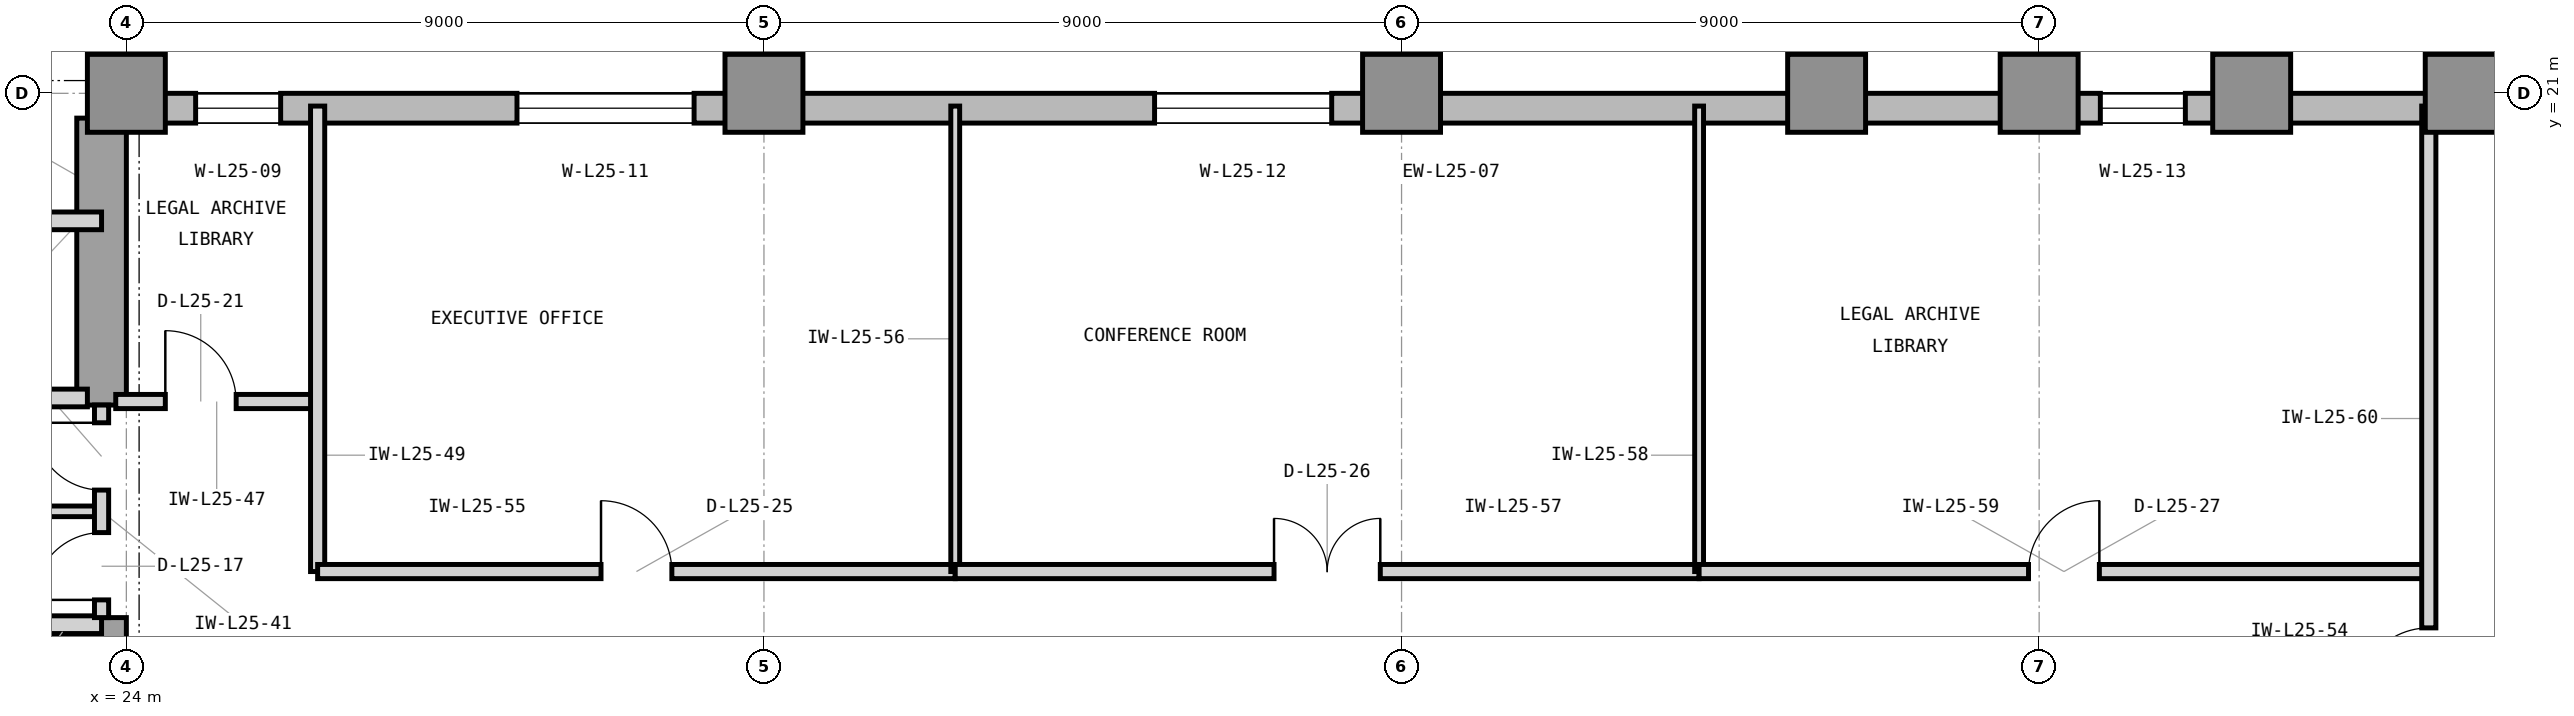
"""IFC4 building model, lengths in metres.
Left out: names, types, materials, properties, quantities, classifications, styles, units other than length and angle.
Written with IfcOpenShell. Run it as: python <this file> out.ifc"""

import sys

from ifc_helpers import new_model, si_unit, direction, frame, frame_2d, origin, origin_2d, place, context, subcontext, project, spatial, rectangle, extrude, element, fill, save


model = new_model("IFC4")
c1 = context("Model", 3, precision=1e-05, world=origin(), true_north=direction((0.0, 1.0)))
c2 = subcontext(c1, "Body", "Model", "MODEL_VIEW")
j1 = project(units=[si_unit("LENGTHUNIT", "METRE"), si_unit("PLANEANGLEUNIT", "RADIAN")], contexts=[c1])
p1 = place(None, origin())
s1 = spatial("IfcSite", under=j1, at=p1, CompositionType="ELEMENT")
p2 = place(p1, origin())
s2 = spatial("IfcBuilding", under=s1, at=p2, CompositionType="ELEMENT")
p3 = place(p2, frame((0.0, 0.0, 108.9)))
s3 = spatial("IfcBuildingStorey", under=s2, at=p3, CompositionType="ELEMENT", Elevation=108.9)
p4 = place(p3, frame((23.65, 10.4, 0.0), z_axis=(0.0, 0.0, 1.0), x_axis=(0.0, 1.0, 0.0)))
e1 = element("IfcWall", 1, at=p4, inside=s3, PredefinedType="SHEAR", context=c2, shape_type="SweptSolid", body=[
    extrude(rectangle(XDim=3.2, YDim=0.7, at=frame_2d((1.6, 0.0))), origin(), (0.0, 0.0, 1.0), 3.9),
])
p5 = place(p3, frame((23.65, 16.6, 0.0), z_axis=(0.0, 0.0, 1.0), x_axis=(0.0, 1.0, 0.0)))
e2 = element("IfcWall", 2, at=p5, inside=s3, PredefinedType="SHEAR", context=c2, shape_type="SweptSolid", body=[
    extrude(rectangle(XDim=4.05, YDim=0.7, at=frame_2d((2.025, 0.0))), origin(), (0.0, 0.0, 1.0), 3.9),
])
for number, where, z_axis, x_axis in (
    (3, (24.0, 21.0, 0.0), (0.0, 0.0, 1.0), (1.0, 0.0, 0.0)),
    (4, (33.0, 21.0, 0.0), (0.0, 0.0, 1.0), (1.0, 0.0, 0.0)),
    (5, (42.0, 21.0, 0.0), (0.0, 0.0, 1.0), (1.0, 0.0, 0.0)),
    (6, (48.0, 21.0, 0.0), (0.0, 0.0, 1.0), (1.0, 0.0, 0.0)),
    (7, (51.0, 21.0, 0.0), (0.0, 0.0, 1.0), (1.0, 0.0, 0.0)),
    (8, (54.0, 21.0, 0.0), (0.0, 0.0, 1.0), (1.0, 0.0, 0.0)),
    (9, (57.0, 21.0, 0.0), (0.0, 0.0, 1.0), (1.0, 0.0, 0.0)),
):
    element("IfcColumn", number, at=place(p3, frame(where, z_axis=z_axis, x_axis=x_axis)), inside=s3, PredefinedType="COLUMN", context=c2, shape_type="SweptSolid", body=[
        extrude(rectangle(XDim=1.1, YDim=1.1, at=origin_2d()), origin(), (0.0, 0.0, 1.0), 3.9),
    ])
p6 = place(p3, frame((61.4, 20.79, 0.0), z_axis=(0.0, 0.0, 1.0), x_axis=(-1.0, 0.0, 0.0)))
e10 = element("IfcWall", 10, at=p6, inside=s3, PredefinedType="STANDARD", context=c2, shape_type="SweptSolid", body=[
    extrude(rectangle(XDim=37.4, YDim=0.42, at=frame_2d((18.7, 0.0))), origin(), (0.0, 0.0, 1.0), 3.7),
])
p7 = place(p6, frame((35.222, 0.0, 0.85)))
e11 = element("IfcOpeningElement", 11, at=p7, cuts=e10, PredefinedType="OPENING", context=c2, shape_type="SweptSolid", body=[
    extrude(rectangle(XDim=1.2, YDim=2.25, at=frame_2d((0.6, 1.125))), frame((0.0, 0.22, 0.0), z_axis=(0.0, -1.0, 0.0), x_axis=(1.0, 0.0, 0.0)), (0.0, 0.0, 1.0), 0.44),
])
p8 = place(p6, frame((29.386, 0.0, 0.85)))
e12 = element("IfcOpeningElement", 12, at=p8, cuts=e10, PredefinedType="OPENING", context=c2, shape_type="SweptSolid", body=[
    extrude(rectangle(XDim=2.5, YDim=2.25, at=frame_2d((1.25, 1.125))), frame((0.0, 0.22, 0.0), z_axis=(0.0, -1.0, 0.0), x_axis=(1.0, 0.0, 0.0)), (0.0, 0.0, 1.0), 0.44),
])
p9 = place(p6, frame((20.386, 0.0, 0.85)))
e13 = element("IfcOpeningElement", 13, at=p9, cuts=e10, PredefinedType="OPENING", context=c2, shape_type="SweptSolid", body=[
    extrude(rectangle(XDim=2.5, YDim=2.25, at=frame_2d((1.25, 1.125))), frame((0.0, 0.22, 0.0), z_axis=(0.0, -1.0, 0.0), x_axis=(1.0, 0.0, 0.0)), (0.0, 0.0, 1.0), 0.44),
])
p10 = place(p6, frame((8.336, 0.0, 0.85)))
e14 = element("IfcOpeningElement", 14, at=p10, cuts=e10, PredefinedType="OPENING", context=c2, shape_type="SweptSolid", body=[
    extrude(rectangle(XDim=1.2, YDim=2.25, at=frame_2d((0.6, 1.125))), frame((0.0, 0.22, 0.0), z_axis=(0.0, -1.0, 0.0), x_axis=(1.0, 0.0, 0.0)), (0.0, 0.0, 1.0), 0.44),
])
p11 = place(p3, frame((23.79, 21.0, 0.0), z_axis=(0.0, 0.0, 1.0), x_axis=(0.0, 1.0, 0.0)))
e15 = element("IfcWall", 15, at=p11, inside=s3, PredefinedType="STANDARD", context=c2, shape_type="SweptSolid", body=[
    extrude(rectangle(XDim=25.4, YDim=0.42, at=frame_2d((12.7, 0.0))), origin(), (0.0, 0.0, 1.0), 3.7),
])
p12 = place(p11, frame((11.45, 0.0, 0.85)))
e16 = element("IfcOpeningElement", 16, at=p12, cuts=e15, PredefinedType="OPENING", context=c2, shape_type="SweptSolid", body=[
    extrude(rectangle(XDim=2.5, YDim=2.25, at=frame_2d((1.25, 1.125))), frame((0.0, 0.22, 0.0), z_axis=(0.0, -1.0, 0.0), x_axis=(1.0, 0.0, 0.0)), (0.0, 0.0, 1.0), 0.44),
])
p13 = place(p3, frame((21.05, 16.7, 0.0), z_axis=(0.0, 0.0, 1.0), x_axis=(1.0, 0.0, 0.0)))
e17 = element("IfcWall", 17, at=p13, inside=s3, PredefinedType="PARTITIONING", context=c2, shape_type="SweptSolid", body=[
    extrude(rectangle(XDim=2.4, YDim=0.25, at=frame_2d((1.2, 0.0))), origin(), (0.0, 0.0, 1.0), 3.227),
])
p14 = place(p3, frame((16.45, 19.2, 0.0), z_axis=(0.0, 0.0, 1.0), x_axis=(1.0, 0.0, 0.0)))
e18 = element("IfcWall", 18, at=p14, inside=s3, PredefinedType="PARTITIONING", context=c2, shape_type="SweptSolid", body=[
    extrude(rectangle(XDim=7.2, YDim=0.25, at=frame_2d((3.6, 0.0))), origin(), (0.0, 0.0, 1.0), 3.69),
])
p15 = place(p3, frame((14.7, 13.5, 0.0), z_axis=(0.0, 0.0, 1.0), x_axis=(1.0, 0.0, 0.0)))
e19 = element("IfcWall", 19, at=p15, inside=s3, PredefinedType="PARTITIONING", context=c2, shape_type="SweptSolid", body=[
    extrude(rectangle(XDim=8.95, YDim=0.25, at=frame_2d((4.475, 0.0))), origin(), (0.0, 0.0, 1.0), 3.227),
])
p16 = place(p3, frame((19.65, 15.1, 0.0), z_axis=(0.0, 0.0, 1.0), x_axis=(1.0, 0.0, 0.0)))
e20 = element("IfcWall", 20, at=p16, inside=s3, PredefinedType="PARTITIONING", context=c2, shape_type="SweptSolid", body=[
    extrude(rectangle(XDim=4.0, YDim=0.15, at=frame_2d((2.0, 0.0))), origin(), (0.0, 0.0, 1.0), 3.69),
])
p17 = place(p3, frame((23.65, 13.6, 0.0), z_axis=(0.0, 0.0, 1.0), x_axis=(0.0, 1.0, 0.0)))
e21 = element("IfcWall", 21, at=p17, inside=s3, PredefinedType="PARTITIONING", context=c2, shape_type="SweptSolid", body=[
    extrude(rectangle(XDim=3.0, YDim=0.2, at=frame_2d((1.5, 0.0))), origin(), (0.0, 0.0, 1.0), 3.69),
])
p18 = place(p17, frame((0.25, 0.0, 0.0)))
e22 = element("IfcOpeningElement", 22, at=p18, cuts=e21, PredefinedType="OPENING", context=c2, shape_type="SweptSolid", body=[
    extrude(rectangle(XDim=0.95, YDim=2.1, at=frame_2d((0.475, 1.05))), frame((0.0, 0.11, 0.0), z_axis=(0.0, -1.0, 0.0), x_axis=(1.0, 0.0, 0.0)), (0.0, 0.0, 1.0), 0.22),
])
p19 = place(p17, frame((1.8, 0.0, 0.0)))
e23 = element("IfcOpeningElement", 23, at=p19, cuts=e21, PredefinedType="OPENING", context=c2, shape_type="SweptSolid", body=[
    extrude(rectangle(XDim=0.95, YDim=2.1, at=frame_2d((0.475, 1.05))), frame((0.0, 0.11, 0.0), z_axis=(0.0, -1.0, 0.0), x_axis=(1.0, 0.0, 0.0)), (0.0, 0.0, 1.0), 0.22),
])
p20 = place(p3, frame((23.85, 16.65, 0.0), z_axis=(0.0, 0.0, 1.0), x_axis=(1.0, 0.0, 0.0)))
e24 = element("IfcWall", 24, at=p20, inside=s3, PredefinedType="PARTITIONING", context=c2, shape_type="SweptSolid", body=[
    extrude(rectangle(XDim=2.85, YDim=0.2, at=frame_2d((1.425, 0.0))), origin(), (0.0, 0.0, 1.0), 3.69),
])
p21 = place(p20, frame((0.7, 0.0, 0.0)))
e25 = element("IfcOpeningElement", 25, at=p21, cuts=e24, PredefinedType="OPENING", context=c2, shape_type="SweptSolid", body=[
    extrude(rectangle(XDim=1.0, YDim=2.15, at=frame_2d((0.5, 1.075))), frame((0.0, 0.11, 0.0), z_axis=(0.0, -1.0, 0.0), x_axis=(1.0, 0.0, 0.0)), (0.0, 0.0, 1.0), 0.22),
])
p22 = place(p3, frame((26.7, 14.25, 0.0), z_axis=(0.0, 0.0, 1.0), x_axis=(0.0, 1.0, 0.0)))
e26 = element("IfcWall", 26, at=p22, inside=s3, PredefinedType="PARTITIONING", context=c2, shape_type="SweptSolid", body=[
    extrude(rectangle(XDim=6.57, YDim=0.2, at=frame_2d((3.285, 0.0))), origin(), (0.0, 0.0, 1.0), 3.69),
])
p23 = place(p3, frame((26.7, 14.25, 0.0), z_axis=(0.0, 0.0, 1.0), x_axis=(1.0, 0.0, 0.0)))
e27 = element("IfcWall", 27, at=p23, inside=s3, PredefinedType="PARTITIONING", context=c2, shape_type="SweptSolid", body=[
    extrude(rectangle(XDim=9.0, YDim=0.2, at=frame_2d((4.5, 0.0))), origin(), (0.0, 0.0, 1.0), 3.69),
])
p24 = place(p23, frame((4.0, 0.0, 0.0)))
e28 = element("IfcOpeningElement", 28, at=p24, cuts=e27, PredefinedType="OPENING", context=c2, shape_type="SweptSolid", body=[
    extrude(rectangle(XDim=1.0, YDim=2.15, at=frame_2d((0.5, 1.075))), frame((0.0, 0.11, 0.0), z_axis=(0.0, -1.0, 0.0), x_axis=(1.0, 0.0, 0.0)), (0.0, 0.0, 1.0), 0.22),
])
p25 = place(p3, frame((35.7, 14.25, 0.0), z_axis=(0.0, 0.0, 1.0), x_axis=(0.0, 1.0, 0.0)))
e29 = element("IfcWall", 29, at=p25, inside=s3, PredefinedType="PARTITIONING", context=c2, shape_type="SweptSolid", body=[
    extrude(rectangle(XDim=6.57, YDim=0.125, at=frame_2d((3.285, 0.0))), origin(), (0.0, 0.0, 1.0), 3.69),
])
p26 = place(p3, frame((35.7, 14.25, 0.0), z_axis=(0.0, 0.0, 1.0), x_axis=(1.0, 0.0, 0.0)))
e30 = element("IfcWall", 30, at=p26, inside=s3, PredefinedType="PARTITIONING", context=c2, shape_type="SweptSolid", body=[
    extrude(rectangle(XDim=10.5, YDim=0.2, at=frame_2d((5.25, 0.0))), origin(), (0.0, 0.0, 1.0), 3.69),
])
p27 = place(p26, frame((4.5, 0.0, 0.0)))
e31 = element("IfcOpeningElement", 31, at=p27, cuts=e30, PredefinedType="OPENING", context=c2, shape_type="SweptSolid", body=[
    extrude(rectangle(XDim=1.5, YDim=2.3, at=frame_2d((0.75, 1.15))), frame((0.0, 0.11, 0.0), z_axis=(0.0, -1.0, 0.0), x_axis=(1.0, 0.0, 0.0)), (0.0, 0.0, 1.0), 0.22),
])
p28 = place(p3, frame((46.2, 14.25, 0.0), z_axis=(0.0, 0.0, 1.0), x_axis=(0.0, 1.0, 0.0)))
e32 = element("IfcWall", 32, at=p28, inside=s3, PredefinedType="PARTITIONING", context=c2, shape_type="SweptSolid", body=[
    extrude(rectangle(XDim=6.57, YDim=0.125, at=frame_2d((3.285, 0.0))), origin(), (0.0, 0.0, 1.0), 3.69),
])
p29 = place(p3, frame((46.2, 14.25, 0.0), z_axis=(0.0, 0.0, 1.0), x_axis=(1.0, 0.0, 0.0)))
e33 = element("IfcWall", 33, at=p29, inside=s3, PredefinedType="PARTITIONING", context=c2, shape_type="SweptSolid", body=[
    extrude(rectangle(XDim=10.3, YDim=0.2, at=frame_2d((5.15, 0.0))), origin(), (0.0, 0.0, 1.0), 3.69),
])
p30 = place(p29, frame((4.65, 0.0, 0.0)))
e34 = element("IfcOpeningElement", 34, at=p30, cuts=e33, PredefinedType="OPENING", context=c2, shape_type="SweptSolid", body=[
    extrude(rectangle(XDim=1.0, YDim=2.15, at=frame_2d((0.5, 1.075))), frame((0.0, 0.11, 0.0), z_axis=(0.0, -1.0, 0.0), x_axis=(1.0, 0.0, 0.0)), (0.0, 0.0, 1.0), 0.22),
])
p31 = place(p3, frame((56.5, 3.18, 0.0), z_axis=(0.0, 0.0, 1.0), x_axis=(0.0, 1.0, 0.0)))
e35 = element("IfcWall", 35, at=p31, inside=s3, PredefinedType="PARTITIONING", context=c2, shape_type="SweptSolid", body=[
    extrude(rectangle(XDim=17.64, YDim=0.2, at=frame_2d((8.82, 0.0))), origin(), (0.0, 0.0, 1.0), 3.69),
])
p32 = place(p31, frame((9.275, 0.0, 0.0)))
e36 = element("IfcOpeningElement", 36, at=p32, cuts=e35, PredefinedType="OPENING", context=c2, shape_type="SweptSolid", body=[
    extrude(rectangle(XDim=1.0, YDim=2.15, at=frame_2d((0.5, 1.075))), frame((0.0, 0.11, 0.0), z_axis=(0.0, -1.0, 0.0), x_axis=(1.0, 0.0, 0.0)), (0.0, 0.0, 1.0), 0.22),
])
p33 = place(p18, origin())
e37 = element("IfcDoor", 37, at=p33, inside=s3, OperationType="SINGLE_SWING_LEFT", PredefinedType="DOOR", context=c2, shape_type="SweptSolid", body=[
    extrude(rectangle(XDim=0.95, YDim=2.1, at=frame_2d((0.475, 1.05))), frame((0.0, 0.025, 0.0), z_axis=(0.0, -1.0, 0.0), x_axis=(1.0, 0.0, 0.0)), (0.0, 0.0, 1.0), 0.05),
])
fill(e22, e37)
p34 = place(p19, origin())
e38 = element("IfcDoor", 38, at=p34, inside=s3, OperationType="SINGLE_SWING_RIGHT", PredefinedType="DOOR", context=c2, shape_type="SweptSolid", body=[
    extrude(rectangle(XDim=0.95, YDim=2.1, at=frame_2d((0.475, 1.05))), frame((0.0, 0.025, 0.0), z_axis=(0.0, -1.0, 0.0), x_axis=(1.0, 0.0, 0.0)), (0.0, 0.0, 1.0), 0.05),
])
fill(e23, e38)
p35 = place(p21, origin())
e39 = element("IfcDoor", 39, at=p35, inside=s3, OperationType="SINGLE_SWING_LEFT", PredefinedType="DOOR", context=c2, shape_type="SweptSolid", body=[
    extrude(rectangle(XDim=1.0, YDim=2.15, at=frame_2d((0.5, 1.075))), frame((0.0, 0.025, 0.0), z_axis=(0.0, -1.0, 0.0), x_axis=(1.0, 0.0, 0.0)), (0.0, 0.0, 1.0), 0.05),
])
fill(e25, e39)
p36 = place(p24, origin())
e40 = element("IfcDoor", 40, at=p36, inside=s3, OperationType="SINGLE_SWING_LEFT", PredefinedType="DOOR", context=c2, shape_type="SweptSolid", body=[
    extrude(rectangle(XDim=1.0, YDim=2.15, at=frame_2d((0.5, 1.075))), frame((0.0, 0.025, 0.0), z_axis=(0.0, -1.0, 0.0), x_axis=(1.0, 0.0, 0.0)), (0.0, 0.0, 1.0), 0.05),
])
fill(e28, e40)
p37 = place(p27, origin())
e41 = element("IfcDoor", 41, at=p37, inside=s3, OperationType="DOUBLE_DOOR_SINGLE_SWING", PredefinedType="DOOR", context=c2, shape_type="SweptSolid", body=[
    extrude(rectangle(XDim=1.5, YDim=2.3, at=frame_2d((0.75, 1.15))), frame((0.0, 0.025, 0.0), z_axis=(0.0, -1.0, 0.0), x_axis=(1.0, 0.0, 0.0)), (0.0, 0.0, 1.0), 0.05),
])
fill(e31, e41)
p38 = place(p30, origin())
e42 = element("IfcDoor", 42, at=p38, inside=s3, OperationType="SINGLE_SWING_RIGHT", PredefinedType="DOOR", context=c2, shape_type="SweptSolid", body=[
    extrude(rectangle(XDim=1.0, YDim=2.15, at=frame_2d((0.5, 1.075))), frame((0.0, 0.025, 0.0), z_axis=(0.0, -1.0, 0.0), x_axis=(1.0, 0.0, 0.0)), (0.0, 0.0, 1.0), 0.05),
])
fill(e34, e42)
p39 = place(p32, origin())
e43 = element("IfcDoor", 43, at=p39, inside=s3, OperationType="SINGLE_SWING_LEFT", PredefinedType="DOOR", context=c2, shape_type="SweptSolid", body=[
    extrude(rectangle(XDim=1.0, YDim=2.15, at=frame_2d((0.5, 1.075))), frame((0.0, 0.025, 0.0), z_axis=(0.0, -1.0, 0.0), x_axis=(1.0, 0.0, 0.0)), (0.0, 0.0, 1.0), 0.05),
])
fill(e36, e43)
p40 = place(p7, origin())
e44 = element("IfcWindow", 44, at=p40, inside=s3, PartitioningType="SINGLE_PANEL", PredefinedType="WINDOW", context=c2, shape_type="SweptSolid", body=[
    extrude(rectangle(XDim=1.2, YDim=2.25, at=frame_2d((0.6, 1.125))), frame((0.0, 0.11, 0.0), z_axis=(0.0, -1.0, 0.0), x_axis=(1.0, 0.0, 0.0)), (0.0, 0.0, 1.0), 0.06),
])
fill(e11, e44)
p41 = place(p8, origin())
e45 = element("IfcWindow", 45, at=p41, inside=s3, PartitioningType="SINGLE_PANEL", PredefinedType="WINDOW", context=c2, shape_type="SweptSolid", body=[
    extrude(rectangle(XDim=2.5, YDim=2.25, at=frame_2d((1.25, 1.125))), frame((0.0, 0.11, 0.0), z_axis=(0.0, -1.0, 0.0), x_axis=(1.0, 0.0, 0.0)), (0.0, 0.0, 1.0), 0.06),
])
fill(e12, e45)
p42 = place(p9, origin())
e46 = element("IfcWindow", 46, at=p42, inside=s3, PartitioningType="SINGLE_PANEL", PredefinedType="WINDOW", context=c2, shape_type="SweptSolid", body=[
    extrude(rectangle(XDim=2.5, YDim=2.25, at=frame_2d((1.25, 1.125))), frame((0.0, 0.11, 0.0), z_axis=(0.0, -1.0, 0.0), x_axis=(1.0, 0.0, 0.0)), (0.0, 0.0, 1.0), 0.06),
])
fill(e13, e46)
p43 = place(p10, origin())
e47 = element("IfcWindow", 47, at=p43, inside=s3, PartitioningType="SINGLE_PANEL", PredefinedType="WINDOW", context=c2, shape_type="SweptSolid", body=[
    extrude(rectangle(XDim=1.2, YDim=2.25, at=frame_2d((0.6, 1.125))), frame((0.0, 0.11, 0.0), z_axis=(0.0, -1.0, 0.0), x_axis=(1.0, 0.0, 0.0)), (0.0, 0.0, 1.0), 0.06),
])
fill(e14, e47)
save(model, sys.argv[1])
